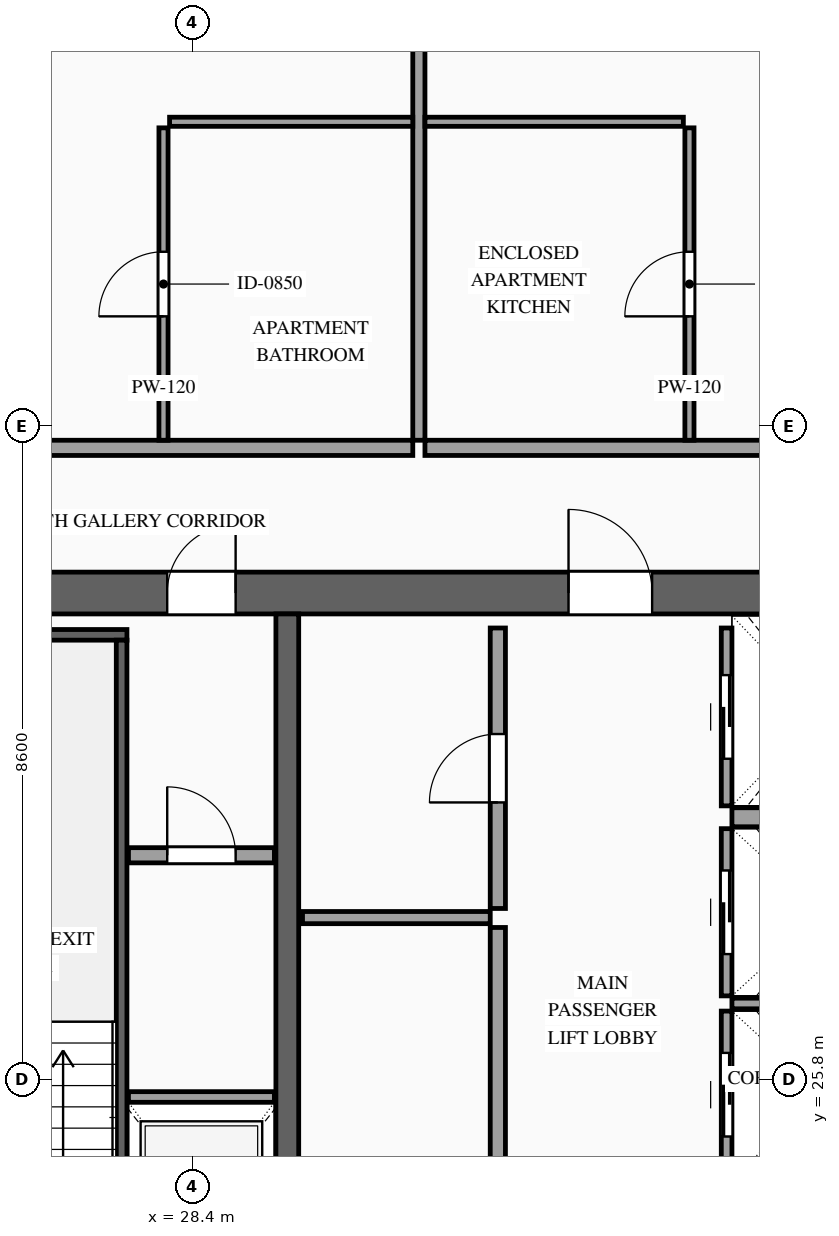
"""IFC4 building model, lengths in metres.
Left out: names, types, materials, properties, quantities, classifications, styles, units other than length and angle.
Written with IfcOpenShell. Run it as: python <this file> out.ifc"""

import sys

from ifc_helpers import new_model, si_unit, direction, frame, frame_2d, origin, place, context, subcontext, project, spatial, rectangle, extrude, source, transform, mapped, element, fill, save


model = new_model("IFC4")
c1 = context("Model", 3, precision=1e-05, world=origin(), true_north=direction((0.0, 1.0)))
c2 = subcontext(c1, "Body", "Model", "MODEL_VIEW")
j1 = project(units=[si_unit("LENGTHUNIT", "METRE"), si_unit("PLANEANGLEUNIT", "RADIAN")], contexts=[c1])
p1 = place(None, origin())
s1 = spatial("IfcSite", under=j1, at=p1, CompositionType="ELEMENT")
p2 = place(p1, origin())
s2 = spatial("IfcBuilding", under=s1, at=p2, CompositionType="ELEMENT")
p3 = place(p2, frame((0.0, 0.0, 241.6)))
s3 = spatial("IfcBuildingStorey", under=s2, at=p3, CompositionType="ELEMENT", Elevation=241.6)
p4 = place(p3, frame((23.525, 32.2, 0.0), z_axis=(0.0, 0.0, 1.0), x_axis=(1.0, 0.0, 0.0)))
e1 = element("IfcWall", 1, at=p4, inside=s3, PredefinedType="SHEAR", context=c2, shape_type="SweptSolid", body=[
    extrude(rectangle(XDim=26.95, YDim=0.55, at=frame_2d((13.475, 0.0))), origin(), (0.0, 0.0, 1.0), 3.5),
])
p5 = place(p4, frame((4.545, 0.0, 0.0)))
e2 = element("IfcOpeningElement", 2, at=p5, cuts=e1, PredefinedType="OPENING", context=c2, shape_type="SweptSolid", body=[
    extrude(rectangle(XDim=0.9, YDim=2.15, at=frame_2d((0.45, 1.075))), frame((0.0, 0.29, 0.0), z_axis=(0.0, -1.0, 0.0), x_axis=(1.0, 0.0, 0.0)), (0.0, 0.0, 1.0), 0.58),
])
p6 = place(p4, frame((9.825, 0.0, 0.0)))
e3 = element("IfcOpeningElement", 3, at=p6, cuts=e1, PredefinedType="OPENING", context=c2, shape_type="SweptSolid", body=[
    extrude(rectangle(XDim=1.1, YDim=2.2, at=frame_2d((0.55, 1.1))), frame((0.0, 0.29, 0.0), z_axis=(0.0, -1.0, 0.0), x_axis=(1.0, 0.0, 0.0)), (0.0, 0.0, 1.0), 0.58),
])
p7 = place(p4, frame((15.675, 0.0, 0.0)))
e4 = element("IfcOpeningElement", 4, at=p7, cuts=e1, PredefinedType="OPENING", context=c2, shape_type="SweptSolid", body=[
    extrude(rectangle(XDim=1.1, YDim=2.2, at=frame_2d((0.55, 1.1))), frame((0.0, 0.29, 0.0), z_axis=(0.0, -1.0, 0.0), x_axis=(1.0, 0.0, 0.0)), (0.0, 0.0, 1.0), 0.58),
])
p8 = place(p4, frame((18.205, 0.0, 0.0)))
e5 = element("IfcOpeningElement", 5, at=p8, cuts=e1, PredefinedType="OPENING", context=c2, shape_type="SweptSolid", body=[
    extrude(rectangle(XDim=0.9, YDim=2.15, at=frame_2d((0.45, 1.075))), frame((0.0, 0.29, 0.0), z_axis=(0.0, -1.0, 0.0), x_axis=(1.0, 0.0, 0.0)), (0.0, 0.0, 1.0), 0.58),
])
p9 = place(p4, frame((19.645, 0.0, 0.0)))
e6 = element("IfcOpeningElement", 6, at=p9, cuts=e1, PredefinedType="OPENING", context=c2, shape_type="SweptSolid", body=[
    extrude(rectangle(XDim=0.9, YDim=2.15, at=frame_2d((0.45, 1.075))), frame((0.0, 0.29, 0.0), z_axis=(0.0, -1.0, 0.0), x_axis=(1.0, 0.0, 0.0)), (0.0, 0.0, 1.0), 0.58),
])
m1 = source(origin(), c2, "Body", "SweptSolid", [
    extrude(rectangle(XDim=12.25, YDim=0.3, at=frame_2d((6.125, 0.0))), origin(), (0.0, 0.0, 1.0), 3.5),
])
p10 = place(p3, frame((29.65, 19.675, 0.0), z_axis=(0.0, 0.0, 1.0), x_axis=(0.0, 1.0, 0.0)))
e7 = element("IfcWall", 7, at=p10, inside=s3, PredefinedType="SOLIDWALL", context=c2, shape_type="MappedRepresentation", body=[
    mapped(m1, transform((0.0, 0.0, 0.0), scale=1.0)),
])
m2 = source(origin(), c2, "Body", "SweptSolid", [
    extrude(rectangle(XDim=1.92, YDim=0.14, at=frame_2d((0.96, 0.0))), origin(), (0.0, 0.0, 1.0), 3.28),
])
p11 = place(p3, frame((27.56, 25.57, 0.0), z_axis=(0.0, 0.0, 1.0), x_axis=(1.0, 0.0, 0.0)))
e8 = element("IfcWall", 8, at=p11, inside=s3, PredefinedType="SOLIDWALL", context=c2, shape_type="MappedRepresentation", body=[
    mapped(m2, transform((0.0, 0.0, 0.0), scale=1.0)),
])
p12 = place(p3, frame((35.43, 24.5, 0.0), z_axis=(0.0, 0.0, 1.0), x_axis=(0.0, 1.0, 0.0)))
e9 = element("IfcWall", 9, at=p12, inside=s3, PredefinedType="SOLIDWALL", context=c2, shape_type="SweptSolid", body=[
    extrude(rectangle(XDim=2.2, YDim=0.14, at=frame_2d((1.1, 0.0))), origin(), (0.0, 0.0, 1.0), 3.28),
])
p13 = place(p12, frame((0.55, 0.0, 0.0)))
e10 = element("IfcOpeningElement", 10, at=p13, cuts=e9, PredefinedType="OPENING", context=c2, shape_type="SweptSolid", body=[
    extrude(rectangle(XDim=1.1, YDim=2.2, at=frame_2d((0.55, 1.1))), frame((0.0, 0.085, 0.0), z_axis=(0.0, -1.0, 0.0), x_axis=(1.0, 0.0, 0.0)), (0.0, 0.0, 1.0), 0.17),
])
m3 = source(origin(), c2, "Body", "SweptSolid", [
    extrude(rectangle(XDim=2.4, YDim=0.14, at=frame_2d((1.2, 0.0))), origin(), (0.0, 0.0, 1.0), 3.28),
])
p14 = place(p3, frame((35.5, 26.8, 0.0), z_axis=(0.0, 0.0, 1.0), x_axis=(1.0, 0.0, 0.0)))
e11 = element("IfcWall", 11, at=p14, inside=s3, PredefinedType="SOLIDWALL", context=c2, shape_type="MappedRepresentation", body=[
    mapped(m3, transform((0.0, 0.0, 0.0), scale=1.0)),
])
p15 = place(p3, frame((35.43, 26.9, 0.0), z_axis=(0.0, 0.0, 1.0), x_axis=(0.0, 1.0, 0.0)))
e12 = element("IfcWall", 12, at=p15, inside=s3, PredefinedType="SOLIDWALL", context=c2, shape_type="SweptSolid", body=[
    extrude(rectangle(XDim=2.2, YDim=0.14, at=frame_2d((1.1, 0.0))), origin(), (0.0, 0.0, 1.0), 3.28),
])
p16 = place(p15, frame((0.55, 0.0, 0.0)))
e13 = element("IfcOpeningElement", 13, at=p16, cuts=e12, PredefinedType="OPENING", context=c2, shape_type="SweptSolid", body=[
    extrude(rectangle(XDim=1.1, YDim=2.2, at=frame_2d((0.55, 1.1))), frame((0.0, 0.085, 0.0), z_axis=(0.0, -1.0, 0.0), x_axis=(1.0, 0.0, 0.0)), (0.0, 0.0, 1.0), 0.17),
])
p17 = place(p3, frame((35.43, 29.4, 0.0), z_axis=(0.0, 0.0, 1.0), x_axis=(0.0, 1.0, 0.0)))
e14 = element("IfcWall", 14, at=p17, inside=s3, PredefinedType="SOLIDWALL", context=c2, shape_type="SweptSolid", body=[
    extrude(rectangle(XDim=2.34, YDim=0.14, at=frame_2d((1.17, 0.0))), origin(), (0.0, 0.0, 1.0), 3.28),
])
p18 = place(p17, frame((0.62, 0.0, 0.0)))
e15 = element("IfcOpeningElement", 15, at=p18, cuts=e14, PredefinedType="OPENING", context=c2, shape_type="SweptSolid", body=[
    extrude(rectangle(XDim=1.1, YDim=2.2, at=frame_2d((0.55, 1.1))), frame((0.0, 0.085, 0.0), z_axis=(0.0, -1.0, 0.0), x_axis=(1.0, 0.0, 0.0)), (0.0, 0.0, 1.0), 0.17),
])
m4 = source(origin(), c2, "Body", "SweptSolid", [
    extrude(rectangle(XDim=2.4, YDim=0.25, at=frame_2d((1.2, 0.0))), origin(), (0.0, 0.0, 1.0), 3.28),
])
p19 = place(p3, frame((35.5, 29.25, 0.0), z_axis=(0.0, 0.0, 1.0), x_axis=(1.0, 0.0, 0.0)))
e16 = element("IfcWall", 16, at=p19, inside=s3, PredefinedType="SOLIDWALL", context=c2, shape_type="MappedRepresentation", body=[
    mapped(m4, transform((0.0, 0.0, 0.0), scale=1.0)),
])
m5 = source(origin(), c2, "Body", "SweptSolid", [
    extrude(rectangle(XDim=3.28, YDim=0.14, at=frame_2d((1.64, 0.0))), origin(), (0.0, 0.0, 1.0), 3.28),
])
p20 = place(p3, frame((24.26, 31.65, 0.0), z_axis=(0.0, 0.0, 1.0), x_axis=(1.0, 0.0, 0.0)))
e17 = element("IfcWall", 17, at=p20, inside=s3, PredefinedType="SOLIDWALL", context=c2, shape_type="MappedRepresentation", body=[
    mapped(m5, transform((0.0, 0.0, 0.0), scale=1.0)),
])
m6 = source(origin(), c2, "Body", "SweptSolid", [
    extrude(rectangle(XDim=8.94, YDim=0.14, at=frame_2d((4.47, 0.0))), origin(), (0.0, 0.0, 1.0), 3.28),
])
p21 = place(p3, frame((27.47, 22.64, 0.0), z_axis=(0.0, 0.0, 1.0), x_axis=(0.0, 1.0, 0.0)))
e18 = element("IfcWall", 18, at=p21, inside=s3, PredefinedType="SOLIDWALL", context=c2, shape_type="MappedRepresentation", body=[
    mapped(m6, transform((0.0, 0.0, 0.0), scale=1.0)),
])
p22 = place(p3, frame((27.56, 28.75, 0.0), z_axis=(0.0, 0.0, 1.0), x_axis=(1.0, 0.0, 0.0)))
e19 = element("IfcWall", 19, at=p22, inside=s3, PredefinedType="PARTITIONING", context=c2, shape_type="SweptSolid", body=[
    extrude(rectangle(XDim=1.92, YDim=0.2, at=frame_2d((0.96, 0.0))), origin(), (0.0, 0.0, 1.0), 3.28),
])
p23 = place(p22, frame((0.51, 0.0, 0.0)))
e20 = element("IfcOpeningElement", 20, at=p23, cuts=e19, PredefinedType="OPENING", context=c2, shape_type="SweptSolid", body=[
    extrude(rectangle(XDim=0.9, YDim=2.15, at=frame_2d((0.45, 1.075))), frame((0.0, 0.115, 0.0), z_axis=(0.0, -1.0, 0.0), x_axis=(1.0, 0.0, 0.0)), (0.0, 0.0, 1.0), 0.23),
])
p24 = place(p3, frame((32.42, 19.86, 0.0), z_axis=(0.0, 0.0, 1.0), x_axis=(0.0, 1.0, 0.0)))
e21 = element("IfcWall", 21, at=p24, inside=s3, PredefinedType="PARTITIONING", context=c2, shape_type="SweptSolid", body=[
    extrude(rectangle(XDim=7.94, YDim=0.2, at=frame_2d((3.97, 0.0))), origin(), (0.0, 0.0, 1.0), 3.28),
])
p25 = place(p24, frame((3.52, 0.0, 0.0)))
e22 = element("IfcOpeningElement", 22, at=p25, cuts=e21, PredefinedType="OPENING", context=c2, shape_type="SweptSolid", body=[
    extrude(rectangle(XDim=0.9, YDim=2.15, at=frame_2d((0.45, 1.075))), frame((0.0, 0.115, 0.0), z_axis=(0.0, -1.0, 0.0), x_axis=(1.0, 0.0, 0.0)), (0.0, 0.0, 1.0), 0.23),
])
p26 = place(p3, frame((32.42, 28.05, 0.0), z_axis=(0.0, 0.0, 1.0), x_axis=(0.0, 1.0, 0.0)))
e23 = element("IfcWall", 23, at=p26, inside=s3, PredefinedType="PARTITIONING", context=c2, shape_type="SweptSolid", body=[
    extrude(rectangle(XDim=3.69, YDim=0.2, at=frame_2d((1.845, 0.0))), origin(), (0.0, 0.0, 1.0), 3.28),
])
p27 = place(p26, frame((1.395, 0.0, 0.0)))
e24 = element("IfcOpeningElement", 24, at=p27, cuts=e23, PredefinedType="OPENING", context=c2, shape_type="SweptSolid", body=[
    extrude(rectangle(XDim=0.9, YDim=2.15, at=frame_2d((0.45, 1.075))), frame((0.0, 0.115, 0.0), z_axis=(0.0, -1.0, 0.0), x_axis=(1.0, 0.0, 0.0)), (0.0, 0.0, 1.0), 0.23),
])
m7 = source(origin(), c2, "Body", "SweptSolid", [
    extrude(rectangle(XDim=2.47, YDim=0.16, at=frame_2d((1.235, 0.0))), origin(), (0.0, 0.0, 1.0), 3.28),
])
p28 = place(p3, frame((29.85, 27.93, 0.0), z_axis=(0.0, 0.0, 1.0), x_axis=(1.0, 0.0, 0.0)))
e25 = element("IfcWall", 25, at=p28, inside=s3, PredefinedType="PARTITIONING", context=c2, shape_type="MappedRepresentation", body=[
    mapped(m7, transform((0.0, 0.0, 0.0), scale=1.0)),
])
p29 = place(p3, frame((19.44, 34.11, 0.0), z_axis=(0.0, 0.0, 1.0), x_axis=(1.0, 0.0, 0.0)))
e26 = element("IfcWall", 26, at=p29, inside=s3, PredefinedType="PARTITIONING", context=c2, shape_type="SweptSolid", body=[
    extrude(rectangle(XDim=11.861, YDim=0.2, at=frame_2d((5.931, 0.0))), origin(), (0.0, 0.0, 1.0), 3.28),
])
p30 = place(p29, frame((5.531, 0.0, 0.0)))
e27 = element("IfcOpeningElement", 27, at=p30, cuts=e26, PredefinedType="OPENING", context=c2, shape_type="SweptSolid", body=[
    extrude(rectangle(XDim=1.0, YDim=2.2, at=frame_2d((0.5, 1.1))), frame((0.0, 0.115, 0.0), z_axis=(0.0, -1.0, 0.0), x_axis=(1.0, 0.0, 0.0)), (0.0, 0.0, 1.0), 0.23),
])
m8 = source(origin(), c2, "Body", "SweptSolid", [
    extrude(rectangle(XDim=12.04, YDim=0.16, at=frame_2d((6.02, 0.0))), origin(), (0.0, 0.0, 1.0), 3.28),
])
p31 = place(p3, frame((31.381, 34.21, 0.0), z_axis=(0.0, 0.0, 1.0), x_axis=(0.0, 1.0, 0.0)))
e28 = element("IfcWall", 28, at=p31, inside=s3, PredefinedType="PARTITIONING", context=c2, shape_type="MappedRepresentation", body=[
    mapped(m8, transform((0.0, 0.0, 0.0), scale=1.0)),
])
m9 = source(origin(), c2, "Body", "SweptSolid", [
    extrude(rectangle(XDim=3.2, YDim=0.12, at=frame_2d((1.6, 0.0))), origin(), (0.0, 0.0, 1.0), 3.28),
])
p32 = place(p3, frame((28.101, 38.4, 0.0), z_axis=(0.0, 0.0, 1.0), x_axis=(1.0, 0.0, 0.0)))
e29 = element("IfcWall", 29, at=p32, inside=s3, PredefinedType="PARTITIONING", context=c2, shape_type="MappedRepresentation", body=[
    mapped(m9, transform((0.0, 0.0, 0.0), scale=1.0)),
])
p33 = place(p3, frame((28.021, 34.21, 0.0), z_axis=(0.0, 0.0, 1.0), x_axis=(0.0, 1.0, 0.0)))
e30 = element("IfcWall", 30, at=p33, inside=s3, PredefinedType="PARTITIONING", context=c2, shape_type="SweptSolid", body=[
    extrude(rectangle(XDim=4.11, YDim=0.12, at=frame_2d((2.055, 0.0))), origin(), (0.0, 0.0, 1.0), 3.28),
])
p34 = place(p33, frame((1.63, 0.0, 0.0)))
e31 = element("IfcOpeningElement", 31, at=p34, cuts=e30, PredefinedType="OPENING", context=c2, shape_type="SweptSolid", body=[
    extrude(rectangle(XDim=0.85, YDim=2.1, at=frame_2d((0.425, 1.05))), frame((0.0, 0.075, 0.0), z_axis=(0.0, -1.0, 0.0), x_axis=(1.0, 0.0, 0.0)), (0.0, 0.0, 1.0), 0.15),
])
p35 = place(p3, frame((31.461, 34.11, 0.0), z_axis=(0.0, 0.0, 1.0), x_axis=(1.0, 0.0, 0.0)))
e32 = element("IfcWall", 32, at=p35, inside=s3, PredefinedType="PARTITIONING", context=c2, shape_type="SweptSolid", body=[
    extrude(rectangle(XDim=11.429, YDim=0.2, at=frame_2d((5.714, 0.0))), origin(), (0.0, 0.0, 1.0), 3.28),
])
p36 = place(p35, frame((5.314, 0.0, 0.0)))
e33 = element("IfcOpeningElement", 33, at=p36, cuts=e32, PredefinedType="OPENING", context=c2, shape_type="SweptSolid", body=[
    extrude(rectangle(XDim=1.0, YDim=2.2, at=frame_2d((0.5, 1.1))), frame((0.0, 0.115, 0.0), z_axis=(0.0, -1.0, 0.0), x_axis=(1.0, 0.0, 0.0)), (0.0, 0.0, 1.0), 0.23),
])
m10 = source(origin(), c2, "Body", "SweptSolid", [
    extrude(rectangle(XDim=3.4, YDim=0.12, at=frame_2d((1.7, 0.0))), origin(), (0.0, 0.0, 1.0), 3.28),
])
p37 = place(p3, frame((31.461, 38.4, 0.0), z_axis=(0.0, 0.0, 1.0), x_axis=(1.0, 0.0, 0.0)))
e34 = element("IfcWall", 34, at=p37, inside=s3, PredefinedType="PARTITIONING", context=c2, shape_type="MappedRepresentation", body=[
    mapped(m10, transform((0.0, 0.0, 0.0), scale=1.0)),
])
p38 = place(p3, frame((34.941, 34.21, 0.0), z_axis=(0.0, 0.0, 1.0), x_axis=(0.0, 1.0, 0.0)))
e35 = element("IfcWall", 35, at=p38, inside=s3, PredefinedType="PARTITIONING", context=c2, shape_type="SweptSolid", body=[
    extrude(rectangle(XDim=4.11, YDim=0.12, at=frame_2d((2.055, 0.0))), origin(), (0.0, 0.0, 1.0), 3.28),
])
p39 = place(p38, frame((1.63, 0.0, 0.0)))
e36 = element("IfcOpeningElement", 36, at=p39, cuts=e35, PredefinedType="OPENING", context=c2, shape_type="SweptSolid", body=[
    extrude(rectangle(XDim=0.85, YDim=2.1, at=frame_2d((0.425, 1.05))), frame((0.0, 0.075, 0.0), z_axis=(0.0, -1.0, 0.0), x_axis=(1.0, 0.0, 0.0)), (0.0, 0.0, 1.0), 0.15),
])
m11 = source(origin(), c2, "Body", "SweptSolid", [
    extrude(rectangle(XDim=1.1, YDim=2.2, at=frame_2d((0.55, 1.1))), frame((0.0, 0.025, 0.0), z_axis=(0.0, -1.0, 0.0), x_axis=(1.0, 0.0, 0.0)), (0.0, 0.0, 1.0), 0.05),
])
p40 = place(p13, origin())
e37 = element("IfcDoor", 37, at=p40, inside=s3, OperationType="SLIDING_TO_RIGHT", PredefinedType="DOOR", context=c2, shape_type="MappedRepresentation", body=[
    mapped(m11, transform((0.0, 0.0, 0.0), scale=1.0)),
])
fill(e10, e37)
p41 = place(p16, origin())
e38 = element("IfcDoor", 38, at=p41, inside=s3, OperationType="SLIDING_TO_LEFT", PredefinedType="DOOR", context=c2, shape_type="MappedRepresentation", body=[
    mapped(m11, transform((0.0, 0.0, 0.0), scale=1.0)),
])
fill(e13, e38)
p42 = place(p18, origin())
e39 = element("IfcDoor", 39, at=p42, inside=s3, OperationType="SLIDING_TO_RIGHT", PredefinedType="DOOR", context=c2, shape_type="MappedRepresentation", body=[
    mapped(m11, transform((0.0, 0.0, 0.0), scale=1.0)),
])
fill(e15, e39)
m12 = source(origin(), c2, "Body", "SweptSolid", [
    extrude(rectangle(XDim=0.9, YDim=2.15, at=frame_2d((0.45, 1.075))), frame((0.0, 0.025, 0.0), z_axis=(0.0, -1.0, 0.0), x_axis=(1.0, 0.0, 0.0)), (0.0, 0.0, 1.0), 0.05),
])
p43 = place(p5, origin())
e40 = element("IfcDoor", 40, at=p43, inside=s3, OperationType="SINGLE_SWING_RIGHT", PredefinedType="DOOR", context=c2, shape_type="MappedRepresentation", body=[
    mapped(m12, transform((0.0, 0.0, 0.0), scale=1.0)),
])
fill(e2, e40)
m13 = source(origin(), c2, "Body", "SweptSolid", [
    extrude(rectangle(XDim=1.1, YDim=2.2, at=frame_2d((0.55, 1.1))), frame((0.0, 0.025, 0.0), z_axis=(0.0, -1.0, 0.0), x_axis=(1.0, 0.0, 0.0)), (0.0, 0.0, 1.0), 0.05),
])
p44 = place(p6, origin())
e41 = element("IfcDoor", 41, at=p44, inside=s3, OperationType="SINGLE_SWING_LEFT", PredefinedType="DOOR", context=c2, shape_type="MappedRepresentation", body=[
    mapped(m13, transform((0.0, 0.0, 0.0), scale=1.0)),
])
fill(e3, e41)
p45 = place(p23, origin())
e42 = element("IfcDoor", 42, at=p45, inside=s3, OperationType="SINGLE_SWING_LEFT", PredefinedType="DOOR", context=c2, shape_type="MappedRepresentation", body=[
    mapped(m12, transform((0.0, 0.0, 0.0), scale=1.0)),
])
fill(e20, e42)
p46 = place(p27, origin())
e43 = element("IfcDoor", 43, at=p46, inside=s3, OperationType="SINGLE_SWING_LEFT", PredefinedType="DOOR", context=c2, shape_type="MappedRepresentation", body=[
    mapped(m12, transform((0.0, 0.0, 0.0), scale=1.0)),
])
fill(e24, e43)
m14 = source(origin(), c2, "Body", "SweptSolid", [
    extrude(rectangle(XDim=0.85, YDim=2.1, at=frame_2d((0.425, 1.05))), frame((0.0, 0.025, 0.0), z_axis=(0.0, -1.0, 0.0), x_axis=(1.0, 0.0, 0.0)), (0.0, 0.0, 1.0), 0.05),
])
p47 = place(p34, origin())
e44 = element("IfcDoor", 44, at=p47, inside=s3, OperationType="SINGLE_SWING_LEFT", PredefinedType="DOOR", context=c2, shape_type="MappedRepresentation", body=[
    mapped(m14, transform((0.0, 0.0, 0.0), scale=1.0)),
])
fill(e31, e44)
p48 = place(p39, origin())
e45 = element("IfcDoor", 45, at=p48, inside=s3, OperationType="SINGLE_SWING_LEFT", PredefinedType="DOOR", context=c2, shape_type="MappedRepresentation", body=[
    mapped(m14, transform((0.0, 0.0, 0.0), scale=1.0)),
])
fill(e36, e45)
save(model, sys.argv[1])
